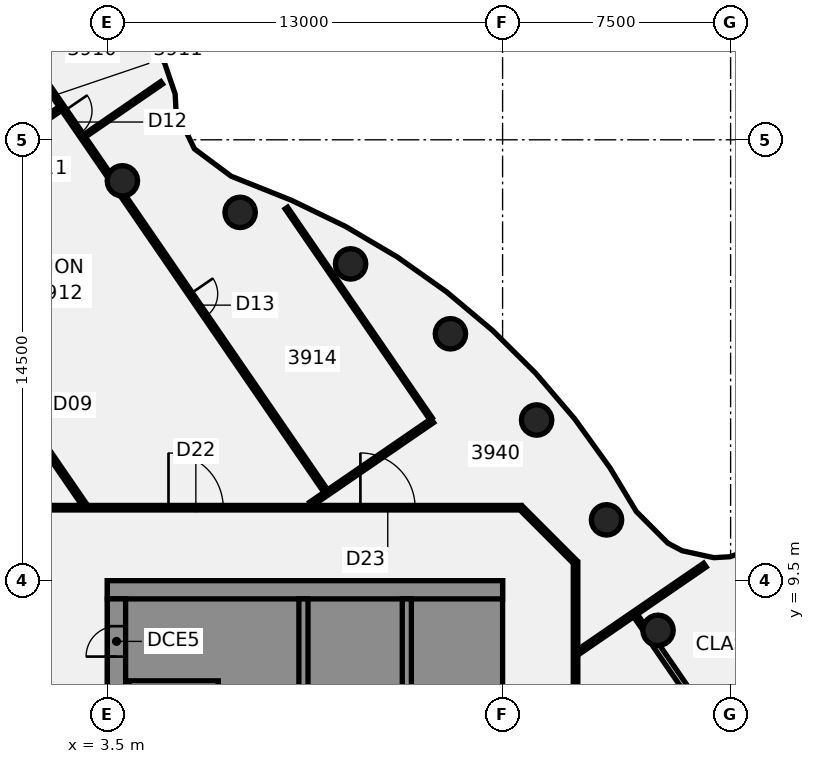
"""IFC4 building model, lengths in metres.
Left out: names, types, materials, properties, quantities, classifications, styles, units other than length and angle.
Written with IfcOpenShell. Run it as: python <this file> out.ifc"""

import sys

from ifc_helpers import new_model, si_unit, direction, frame, frame_2d, origin, origin_2d, place, context, subcontext, project, spatial, polyline, rectangle, circle, outline, extrude, element, fill, save


model = new_model("IFC4")
c1 = context("Model", 3, precision=1e-05, world=origin(), true_north=direction((0.0, 1.0)))
c2 = subcontext(c1, "Body", "Model", "MODEL_VIEW")
j1 = project(units=[si_unit("LENGTHUNIT", "METRE"), si_unit("PLANEANGLEUNIT", "RADIAN")], contexts=[c1])
p1 = place(None, origin())
s1 = spatial("IfcSite", under=j1, at=p1, CompositionType="ELEMENT")
p2 = place(p1, origin())
s2 = spatial("IfcBuilding", under=s1, at=p2, CompositionType="ELEMENT")
p3 = place(p2, frame((0.0, 0.0, 159.25)))
s3 = spatial("IfcBuildingStorey", under=s2, at=p3, CompositionType="ELEMENT", Elevation=159.25)
for number, where, z_axis, x_axis in (
    (1, (21.613, 7.866, -0.14), (0.0, 0.0, 1.0), (1.0, 0.0, 0.0)),
    (2, (19.919, 11.5, -0.14), (0.0, 0.0, 1.0), (1.0, 0.0, 0.0)),
    (3, (17.619, 14.784, -0.14), (0.0, 0.0, 1.0), (1.0, 0.0, 0.0)),
    (4, (14.784, 17.619, -0.14), (0.0, 0.0, 1.0), (1.0, 0.0, 0.0)),
    (5, (11.5, 19.919, -0.14), (0.0, 0.0, 1.0), (1.0, 0.0, 0.0)),
    (6, (7.866, 21.613, -0.14), (0.0, 0.0, 1.0), (1.0, 0.0, 0.0)),
    (7, (3.994, 22.651, -0.14), (0.0, 0.0, 1.0), (1.0, 0.0, 0.0)),
):
    element("IfcColumn", number, at=place(p3, frame(where, z_axis=z_axis, x_axis=x_axis)), inside=s3, PredefinedType="COLUMN", context=c2, shape_type="SweptSolid", body=[
        extrude(circle(Radius=0.5, at=origin_2d()), origin(), (0.0, 0.0, 1.0), 3.75),
    ])
p4 = place(p3, frame((-3.55, 21.163, 0.0), z_axis=(0.0, 0.0, 1.0), x_axis=(0.566071104364, -0.824356418549, 0.0)))
e8 = element("IfcWall", 8, at=p4, inside=s3, PredefinedType="PARTITIONING", context=c2, shape_type="SweptSolid", body=[
    extrude(rectangle(XDim=11.117, YDim=0.15, at=frame_2d((5.559, 0.0))), origin(), (0.0, 0.0, 1.0), 3.01),
])
p5 = place(p4, frame((6.67, 0.0, 0.0)))
e9 = element("IfcOpeningElement", 9, at=p5, cuts=e8, PredefinedType="OPENING", context=c2, shape_type="SweptSolid", body=[
    extrude(rectangle(XDim=0.9, YDim=2.1, at=frame_2d((0.45, 1.05))), frame((0.0, 0.085, 0.0), z_axis=(0.0, -1.0, 0.0), x_axis=(1.0, 0.0, 0.0)), (0.0, 0.0, 1.0), 0.17),
])
p6 = place(p3, frame((0.708, 26.975, 0.0), z_axis=(0.0, 0.0, 1.0), x_axis=(0.565998885558, -0.824406005283, 0.0)))
e10 = element("IfcWall", 10, at=p6, inside=s3, PredefinedType="PARTITIONING", context=c2, shape_type="SweptSolid", body=[
    extrude(rectangle(XDim=5.202, YDim=0.15, at=frame_2d((2.601, 0.0))), origin(), (0.0, 0.0, 1.0), 3.01),
])
p7 = place(p6, frame((2.449, 0.0, 0.0)))
e11 = element("IfcOpeningElement", 11, at=p7, cuts=e10, PredefinedType="OPENING", context=c2, shape_type="SweptSolid", body=[
    extrude(rectangle(XDim=0.9, YDim=2.1, at=frame_2d((0.45, 1.05))), frame((0.0, 0.085, 0.0), z_axis=(0.0, -1.0, 0.0), x_axis=(1.0, 0.0, 0.0)), (0.0, 0.0, 1.0), 0.17),
])
p8 = place(p3, frame((3.907, 22.315, 0.0), z_axis=(0.0, 0.0, 1.0), x_axis=(0.565998846093, -0.824406032378, 0.0)))
e12 = element("IfcWall", 12, at=p8, inside=s3, PredefinedType="PARTITIONING", context=c2, shape_type="SweptSolid", body=[
    extrude(rectangle(XDim=11.968, YDim=0.15, at=frame_2d((5.984, 0.0))), origin(), (0.0, 0.0, 1.0), 3.01),
])
p9 = place(p8, frame((4.103, 0.0, 0.0)))
e13 = element("IfcOpeningElement", 13, at=p9, cuts=e12, PredefinedType="OPENING", context=c2, shape_type="SweptSolid", body=[
    extrude(rectangle(XDim=0.9, YDim=2.1, at=frame_2d((0.45, 1.05))), frame((0.0, 0.085, 0.0), z_axis=(0.0, -1.0, 0.0), x_axis=(1.0, 0.0, 0.0)), (0.0, 0.0, 1.0), 0.17),
])
p10 = place(p3, frame((9.388, 21.755, 0.0), z_axis=(0.0, 0.0, 1.0), x_axis=(0.566078955543, -0.824351027228, 0.0)))
e14 = element("IfcWall", 14, at=p10, inside=s3, PredefinedType="PARTITIONING", context=c2, shape_type="SweptSolid", body=[
    extrude(rectangle(XDim=8.408, YDim=0.1, at=frame_2d((4.204, 0.0))), origin(), (0.0, 0.0, 1.0), 3.01),
])
p11 = place(p3, frame((20.875, 8.35, 0.0), z_axis=(0.0, 0.0, 1.0), x_axis=(0.56618647865, -0.824277181168, 0.0)))
e15 = element("IfcWall", 15, at=p11, inside=s3, PredefinedType="PARTITIONING", context=c2, shape_type="SweptSolid", body=[
    extrude(rectangle(XDim=0.454, YDim=0.15, at=frame_2d((0.227, 0.0))), origin(), (0.0, 0.0, 1.0), 3.01),
])
p12 = place(p3, frame((21.545, 7.375, 0.0), z_axis=(0.0, 0.0, 1.0), x_axis=(0.566178235937, -0.824282842932, 0.0)))
e16 = element("IfcWall", 16, at=p12, inside=s3, PredefinedType="PARTITIONING", context=c2, shape_type="SweptSolid", body=[
    extrude(rectangle(XDim=13.035, YDim=0.2, at=frame_2d((6.518, 0.0))), origin(), (0.0, 0.0, 1.0), 3.01),
])
p13 = place(p12, frame((5.737, 0.0, 0.0)))
e17 = element("IfcOpeningElement", 17, at=p13, cuts=e16, PredefinedType="OPENING", context=c2, shape_type="SweptSolid", body=[
    extrude(rectangle(XDim=1.4, YDim=2.1, at=frame_2d((0.7, 1.05))), frame((0.0, 0.11, 0.0), z_axis=(0.0, -1.0, 0.0), x_axis=(1.0, 0.0, 0.0)), (0.0, 0.0, 1.0), 0.22),
])
p14 = place(p3, frame((17.128, 11.872, 0.0), z_axis=(0.0, 0.0, 1.0), x_axis=(0.707106781187, -0.707106781187, 0.0)))
e18 = element("IfcWall", 18, at=p14, inside=s3, PredefinedType="PARTITIONING", context=c2, shape_type="SweptSolid", body=[
    extrude(rectangle(XDim=2.465, YDim=0.15, at=frame_2d((1.232, 0.0))), origin(), (0.0, 0.0, 1.0), 3.01),
])
p15 = place(p3, frame((-17.065, 11.9, 0.0), z_axis=(0.0, 0.0, 1.0), x_axis=(1.0, 0.0, 0.0)))
e19 = element("IfcWall", 19, at=p15, inside=s3, PredefinedType="PARTITIONING", context=c2, shape_type="SweptSolid", body=[
    extrude(rectangle(XDim=34.165, YDim=0.15, at=frame_2d((17.083, 0.0))), origin(), (0.0, 0.0, 1.0), 3.01),
])
p16 = place(p15, frame((22.576, 0.0, 0.0)))
e20 = element("IfcOpeningElement", 20, at=p16, cuts=e19, PredefinedType="OPENING", context=c2, shape_type="SweptSolid", body=[
    extrude(rectangle(XDim=1.8, YDim=2.1, at=frame_2d((0.9, 1.05))), frame((0.0, 0.085, 0.0), z_axis=(0.0, -1.0, 0.0), x_axis=(1.0, 0.0, 0.0)), (0.0, 0.0, 1.0), 0.17),
])
p17 = place(p15, frame((28.888, 0.0, 0.0)))
e21 = element("IfcOpeningElement", 21, at=p17, cuts=e19, PredefinedType="OPENING", context=c2, shape_type="SweptSolid", body=[
    extrude(rectangle(XDim=1.8, YDim=2.1, at=frame_2d((0.9, 1.05))), frame((0.0, 0.085, 0.0), z_axis=(0.0, -1.0, 0.0), x_axis=(1.0, 0.0, 0.0)), (0.0, 0.0, 1.0), 0.17),
])
p18 = place(p15, frame((8.376, 0.0, 0.0)))
e22 = element("IfcOpeningElement", 22, at=p18, cuts=e19, PredefinedType="OPENING", context=c2, shape_type="SweptSolid", body=[
    extrude(rectangle(XDim=1.8, YDim=2.1, at=frame_2d((0.9, 1.05))), frame((0.0, 0.085, 0.0), z_axis=(0.0, -1.0, 0.0), x_axis=(1.0, 0.0, 0.0)), (0.0, 0.0, 1.0), 0.17),
])
p19 = place(p3, frame((2.751, 24.133, 0.0), z_axis=(0.0, 0.0, 1.0), x_axis=(0.824324458203, 0.566117644672, 0.0)))
e23 = element("IfcWall", 23, at=p19, inside=s3, PredefinedType="PARTITIONING", context=c2, shape_type="SweptSolid", body=[
    extrude(rectangle(XDim=3.075, YDim=0.1, at=frame_2d((1.538, 0.0))), origin(), (0.0, 0.0, 1.0), 3.01),
])
p20 = place(p3, frame((-7.49, 21.466, 0.0), z_axis=(0.0, 0.0, 1.0), x_axis=(0.824395355521, 0.566014397162, 0.0)))
e24 = element("IfcWall", 24, at=p20, inside=s3, PredefinedType="PARTITIONING", context=c2, shape_type="SweptSolid", body=[
    extrude(rectangle(XDim=13.176, YDim=0.2, at=frame_2d((6.588, 0.0))), origin(), (0.0, 0.0, 1.0), 3.01),
])
p21 = place(p20, frame((5.576, 0.0, 0.0)))
e25 = element("IfcOpeningElement", 25, at=p21, cuts=e24, PredefinedType="OPENING", context=c2, shape_type="SweptSolid", body=[
    extrude(rectangle(XDim=1.4, YDim=2.1, at=frame_2d((0.7, 1.05))), frame((0.0, 0.11, 0.0), z_axis=(0.0, -1.0, 0.0), x_axis=(1.0, 0.0, 0.0)), (0.0, 0.0, 1.0), 0.22),
])
p22 = place(p3, frame((0.366, 23.941, 0.0), z_axis=(0.0, 0.0, 1.0), x_axis=(0.82505756901, 0.565048677389, 0.0)))
e26 = element("IfcWall", 26, at=p22, inside=s3, PredefinedType="PARTITIONING", context=c2, shape_type="SweptSolid", body=[
    extrude(rectangle(XDim=1.919, YDim=0.15, at=frame_2d((0.959, 0.0))), origin(), (0.0, 0.0, 1.0), 3.01),
])
p23 = place(p3, frame((10.196, 12.019, 0.0), z_axis=(0.0, 0.0, 1.0), x_axis=(0.824296186605, 0.566158808771, 0.0)))
e27 = element("IfcWall", 27, at=p23, inside=s3, PredefinedType="PARTITIONING", context=c2, shape_type="SweptSolid", body=[
    extrude(rectangle(XDim=4.845, YDim=0.15, at=frame_2d((2.423, 0.0))), origin(), (0.0, 0.0, 1.0), 3.01),
])
p24 = place(p3, frame((18.999, 7.159, 0.0), z_axis=(0.0, 0.0, 1.0), x_axis=(0.824433154218, 0.565959339728, 0.0)))
e28 = element("IfcWall", 28, at=p24, inside=s3, PredefinedType="PARTITIONING", context=c2, shape_type="SweptSolid", body=[
    extrude(rectangle(XDim=5.041, YDim=0.15, at=frame_2d((2.521, 0.0))), origin(), (0.0, 0.0, 1.0), 3.01),
])
p25 = place(p3, frame((18.9, -10.1, 0.0), z_axis=(0.0, 0.0, 1.0), x_axis=(0.0, 1.0, 0.0)))
e29 = element("IfcWall", 29, at=p25, inside=s3, PredefinedType="PARTITIONING", context=c2, shape_type="SweptSolid", body=[
    extrude(rectangle(XDim=20.2, YDim=0.15, at=frame_2d((10.1, 0.0))), origin(), (0.0, 0.0, 1.0), 3.01),
])
p26 = place(p25, frame((8.047, 0.0, 0.0)))
e30 = element("IfcOpeningElement", 30, at=p26, cuts=e29, PredefinedType="OPENING", context=c2, shape_type="SweptSolid", body=[
    extrude(rectangle(XDim=1.8, YDim=2.1, at=frame_2d((0.9, 1.05))), frame((0.0, 0.085, 0.0), z_axis=(0.0, -1.0, 0.0), x_axis=(1.0, 0.0, 0.0)), (0.0, 0.0, 1.0), 0.17),
])
p27 = place(p25, frame((13.596, 0.0, 0.0)))
e31 = element("IfcOpeningElement", 31, at=p27, cuts=e29, PredefinedType="OPENING", context=c2, shape_type="SweptSolid", body=[
    extrude(rectangle(XDim=0.9, YDim=2.1, at=frame_2d((0.45, 1.05))), frame((0.0, 0.085, 0.0), z_axis=(0.0, -1.0, 0.0), x_axis=(1.0, 0.0, 0.0)), (0.0, 0.0, 1.0), 0.17),
])
p28 = place(p3, origin())
e32 = element("IfcWall", 32, at=p28, inside=s3, PredefinedType="SHEAR", context=c2, shape_type="SweptSolid", body=[
    extrude(outline(polyline([(13.5, -8.125), (13.5, -8.9), (15.9, -8.9), (16.5, -8.9), (16.5, 8.9), (15.9, 8.9), (13.5, 8.9), (13.5, 8.125), (15.9, 8.125), (15.9, 5.625), (13.5, 5.625), (13.5, 5.375), (15.9, 5.375), (15.9, -5.375), (13.5, -5.375), (13.5, -5.625), (15.9, -5.625), (15.9, -8.125), (13.5, -8.125)])), origin(), (0.0, 0.0, 1.0), 3.61),
])
p29 = place(p3, frame((16.5, 9.2, 0.0), z_axis=(0.0, 0.0, 1.0), x_axis=(-1.0, 0.0, 0.0)))
e33 = element("IfcWall", 33, at=p29, inside=s3, PredefinedType="SHEAR", context=c2, shape_type="SweptSolid", body=[
    extrude(rectangle(XDim=13.0, YDim=0.6, at=frame_2d((6.5, 0.0))), origin(), (0.0, 0.0, 1.0), 3.61),
])
p30 = place(p3, origin())
e34 = element("IfcWall", 34, at=p30, inside=s3, PredefinedType="SHEAR", context=c2, shape_type="SweptSolid", body=[
    extrude(outline(polyline([(9.8, -5.375), (7.5, -5.375), (7.5, -2.875), (9.8, -2.875), (9.8, -2.625), (7.5, -2.625), (7.5, -0.125), (9.8, -0.125), (9.8, 0.125), (7.5, 0.125), (7.5, 2.625), (9.8, 2.625), (9.8, 2.875), (7.5, 2.875), (7.5, 5.375), (9.8, 5.375), (9.8, 5.625), (7.5, 5.625), (7.5, 8.125), (9.8, 8.125), (9.8, 8.9), (7.5, 8.9), (7.2, 8.9), (7.2, -5.625), (7.5, -5.625), (9.8, -5.625), (9.8, -5.375)])), origin(), (0.0, 0.0, 1.0), 3.61),
])
p31 = place(p3, frame((13.35, -8.9, 0.0), z_axis=(0.0, 0.0, 1.0), x_axis=(0.0, 1.0, 0.0)))
e35 = element("IfcWall", 35, at=p31, inside=s3, PredefinedType="SHEAR", context=c2, shape_type="SweptSolid", body=[
    extrude(rectangle(XDim=17.8, YDim=0.3, at=frame_2d((8.9, 0.0))), origin(), (0.0, 0.0, 1.0), 3.61),
])
p32 = place(p31, frame((1.325, 0.0, 0.0)))
e36 = element("IfcOpeningElement", 36, at=p32, cuts=e35, PredefinedType="OPENING", context=c2, shape_type="SweptSolid", body=[
    extrude(rectangle(XDim=1.4, YDim=2.1, at=frame_2d((0.7, 1.05))), frame((0.0, 0.16, 0.0), z_axis=(0.0, -1.0, 0.0), x_axis=(1.0, 0.0, 0.0)), (0.0, 0.0, 1.0), 0.32),
])
p33 = place(p31, frame((4.754, 0.0, 0.0)))
e37 = element("IfcOpeningElement", 37, at=p33, cuts=e35, PredefinedType="OPENING", context=c2, shape_type="SweptSolid", body=[
    extrude(rectangle(XDim=1.0, YDim=2.1, at=frame_2d((0.5, 1.05))), frame((0.0, 0.16, 0.0), z_axis=(0.0, -1.0, 0.0), x_axis=(1.0, 0.0, 0.0)), (0.0, 0.0, 1.0), 0.32),
])
p34 = place(p31, frame((10.254, 0.0, 0.0)))
e38 = element("IfcOpeningElement", 38, at=p34, cuts=e35, PredefinedType="OPENING", context=c2, shape_type="SweptSolid", body=[
    extrude(rectangle(XDim=1.0, YDim=2.1, at=frame_2d((0.5, 1.05))), frame((0.0, 0.16, 0.0), z_axis=(0.0, -1.0, 0.0), x_axis=(1.0, 0.0, 0.0)), (0.0, 0.0, 1.0), 0.32),
])
p35 = place(p3, frame((9.95, -8.9, 0.0), z_axis=(0.0, 0.0, 1.0), x_axis=(0.0, 1.0, 0.0)))
e39 = element("IfcWall", 39, at=p35, inside=s3, PredefinedType="SHEAR", context=c2, shape_type="SweptSolid", body=[
    extrude(rectangle(XDim=17.8, YDim=0.3, at=frame_2d((8.9, 0.0))), origin(), (0.0, 0.0, 1.0), 3.61),
])
p36 = place(p35, frame((4.175, 0.0, 0.0)))
e40 = element("IfcOpeningElement", 40, at=p36, cuts=e39, PredefinedType="OPENING", context=c2, shape_type="SweptSolid", body=[
    extrude(rectangle(XDim=1.2, YDim=2.1, at=frame_2d((0.6, 1.05))), frame((0.0, 0.16, 0.0), z_axis=(0.0, -1.0, 0.0), x_axis=(1.0, 0.0, 0.0)), (0.0, 0.0, 1.0), 0.32),
])
p37 = place(p35, frame((6.925, 0.0, 0.0)))
e41 = element("IfcOpeningElement", 41, at=p37, cuts=e39, PredefinedType="OPENING", context=c2, shape_type="SweptSolid", body=[
    extrude(rectangle(XDim=1.2, YDim=2.1, at=frame_2d((0.6, 1.05))), frame((0.0, 0.16, 0.0), z_axis=(0.0, -1.0, 0.0), x_axis=(1.0, 0.0, 0.0)), (0.0, 0.0, 1.0), 0.32),
])
p38 = place(p3, frame((3.8, -8.9, 0.0), z_axis=(0.0, 0.0, 1.0), x_axis=(0.0, 1.0, 0.0)))
e42 = element("IfcWall", 42, at=p38, inside=s3, PredefinedType="SHEAR", context=c2, shape_type="SweptSolid", body=[
    extrude(rectangle(XDim=17.8, YDim=0.6, at=frame_2d((8.9, 0.0))), origin(), (0.0, 0.0, 1.0), 3.61),
])
p39 = place(p38, frame((1.25, 0.0, 0.0)))
e43 = element("IfcOpeningElement", 43, at=p39, cuts=e42, PredefinedType="OPENING", context=c2, shape_type="SweptSolid", body=[
    extrude(rectangle(XDim=1.8, YDim=2.1, at=frame_2d((0.9, 1.05))), frame((0.0, 0.31, 0.0), z_axis=(0.0, -1.0, 0.0), x_axis=(1.0, 0.0, 0.0)), (0.0, 0.0, 1.0), 0.62),
])
p40 = place(p38, frame((12.377, 0.0, 0.0)))
e44 = element("IfcOpeningElement", 44, at=p40, cuts=e42, PredefinedType="OPENING", context=c2, shape_type="SweptSolid", body=[
    extrude(rectangle(XDim=1.0, YDim=2.1, at=frame_2d((0.5, 1.05))), frame((0.0, 0.31, 0.0), z_axis=(0.0, -1.0, 0.0), x_axis=(1.0, 0.0, 0.0)), (0.0, 0.0, 1.0), 0.62),
])
p41 = place(p38, frame((15.903, 0.0, 0.0)))
e45 = element("IfcOpeningElement", 45, at=p41, cuts=e42, PredefinedType="OPENING", context=c2, shape_type="SweptSolid", body=[
    extrude(rectangle(XDim=1.0, YDim=2.1, at=frame_2d((0.5, 1.05))), frame((0.0, 0.31, 0.0), z_axis=(0.0, -1.0, 0.0), x_axis=(1.0, 0.0, 0.0)), (0.0, 0.0, 1.0), 0.62),
])
p42 = place(p3, frame((7.15, 6.08, 0.0), z_axis=(0.0, 0.0, 1.0), x_axis=(-1.0, 0.0, 0.0)))
e46 = element("IfcWall", 46, at=p42, inside=s3, PredefinedType="PARTITIONING", context=c2, shape_type="SweptSolid", body=[
    extrude(rectangle(XDim=2.95, YDim=0.25, at=frame_2d((1.475, 0.0))), origin(), (0.0, 0.0, 1.0), 3.61),
])
p43 = place(p7, origin())
e47 = element("IfcDoor", 47, at=p43, inside=s3, OperationType="SINGLE_SWING_LEFT", PredefinedType="DOOR", context=c2, shape_type="SweptSolid", body=[
    extrude(rectangle(XDim=0.9, YDim=2.1, at=frame_2d((0.45, 1.05))), frame((0.0, 0.025, 0.0), z_axis=(0.0, -1.0, 0.0), x_axis=(1.0, 0.0, 0.0)), (0.0, 0.0, 1.0), 0.05),
])
fill(e11, e47)
p44 = place(p9, origin())
e48 = element("IfcDoor", 48, at=p44, inside=s3, OperationType="SINGLE_SWING_RIGHT", PredefinedType="DOOR", context=c2, shape_type="SweptSolid", body=[
    extrude(rectangle(XDim=0.9, YDim=2.1, at=frame_2d((0.45, 1.05))), frame((0.0, 0.025, 0.0), z_axis=(0.0, -1.0, 0.0), x_axis=(1.0, 0.0, 0.0)), (0.0, 0.0, 1.0), 0.05),
])
fill(e13, e48)
p45 = place(p16, frame((1.8, 0.0, 0.0), z_axis=(0.0, 0.0, 1.0), x_axis=(-1.0, 0.0, 0.0)))
e49 = element("IfcDoor", 49, at=p45, inside=s3, OperationType="DOUBLE_DOOR_SINGLE_SWING", PredefinedType="DOOR", context=c2, shape_type="SweptSolid", body=[
    extrude(rectangle(XDim=1.8, YDim=2.1, at=frame_2d((0.9, 1.05))), frame((0.0, 0.025, 0.0), z_axis=(0.0, -1.0, 0.0), x_axis=(1.0, 0.0, 0.0)), (0.0, 0.0, 1.0), 0.05),
])
fill(e20, e49)
p46 = place(p17, origin())
e50 = element("IfcDoor", 50, at=p46, inside=s3, OperationType="DOUBLE_DOOR_SINGLE_SWING", PredefinedType="DOOR", context=c2, shape_type="SweptSolid", body=[
    extrude(rectangle(XDim=1.8, YDim=2.1, at=frame_2d((0.9, 1.05))), frame((0.0, 0.025, 0.0), z_axis=(0.0, -1.0, 0.0), x_axis=(1.0, 0.0, 0.0)), (0.0, 0.0, 1.0), 0.05),
])
fill(e21, e50)
p47 = place(p41, origin())
e51 = element("IfcDoor", 51, at=p47, inside=s3, OperationType="SINGLE_SWING_LEFT", PredefinedType="DOOR", context=c2, shape_type="SweptSolid", body=[
    extrude(rectangle(XDim=1.0, YDim=2.1, at=frame_2d((0.5, 1.05))), frame((0.0, -0.225, 0.0), z_axis=(0.0, -1.0, 0.0), x_axis=(1.0, 0.0, 0.0)), (0.0, 0.0, 1.0), 0.05),
])
fill(e45, e51)
save(model, sys.argv[1])
